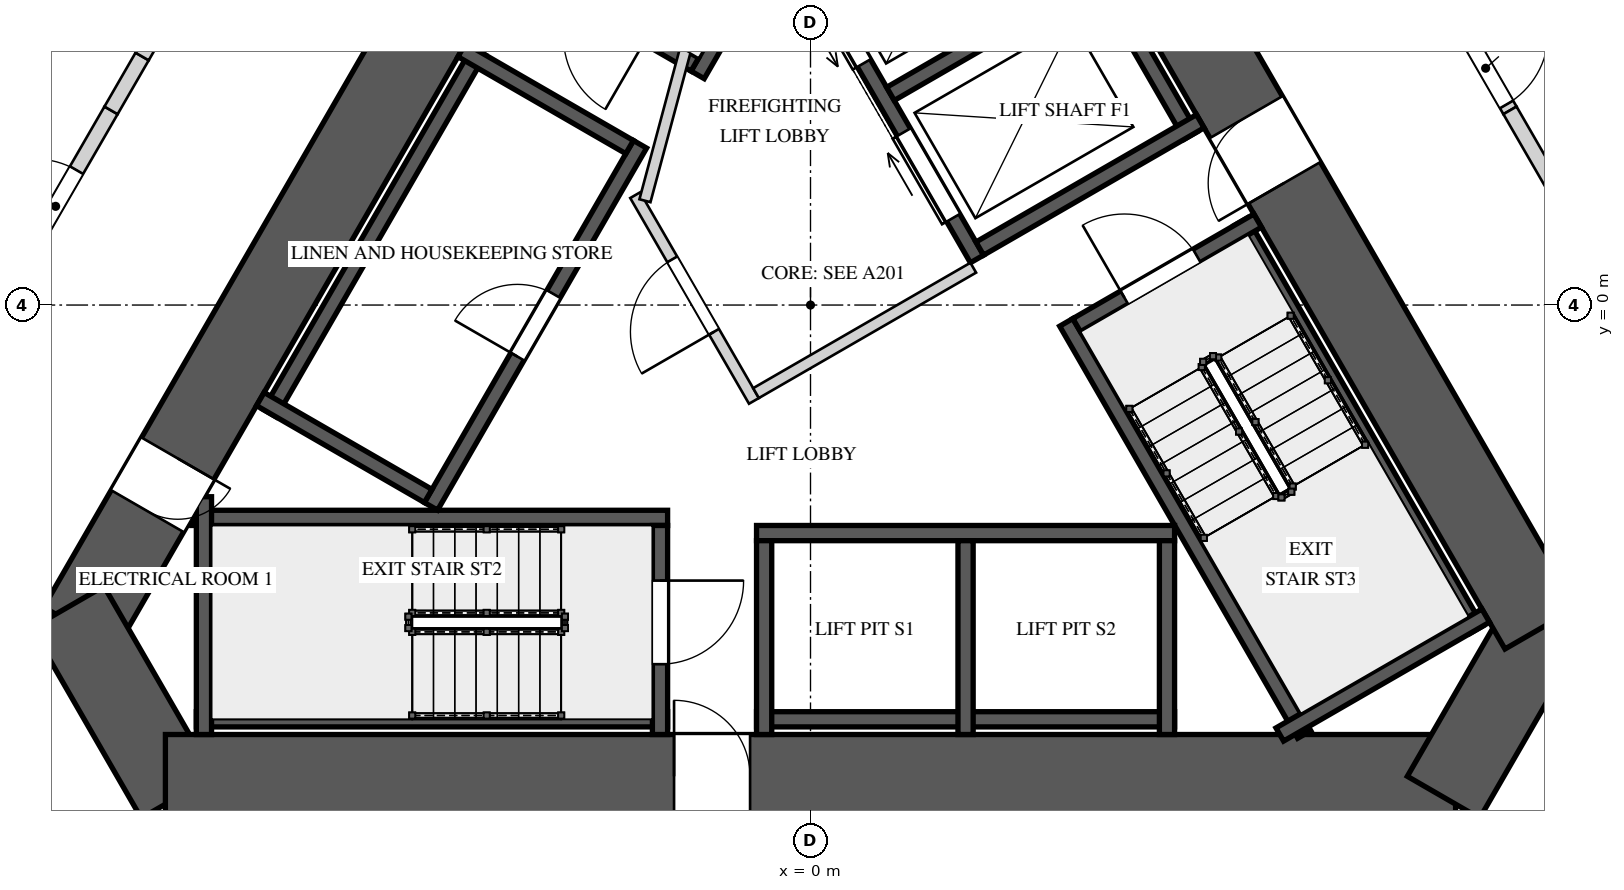
"""IFC4 building model, lengths in metres.
Left out: names, types, materials, properties, quantities, classifications, styles, units other than length and angle.
Written with IfcOpenShell. Run it as: python <this file> out.ifc"""

import sys

from ifc_helpers import new_model, si_unit, direction, frame, frame_2d, origin, place, context, subcontext, project, spatial, polyline, rectangle, outline, extrude, element, fill, save


model = new_model("IFC4")
c1 = context("Model", 3, precision=1e-05, world=origin(), true_north=direction((0.0, 1.0)))
c2 = subcontext(c1, "Body", "Model", "MODEL_VIEW")
j1 = project(units=[si_unit("LENGTHUNIT", "METRE"), si_unit("PLANEANGLEUNIT", "RADIAN")], contexts=[c1])
p1 = place(None, origin())
s1 = spatial("IfcSite", under=j1, at=p1, CompositionType="ELEMENT")
p2 = place(p1, origin())
s2 = spatial("IfcBuilding", under=s1, at=p2, CompositionType="ELEMENT")
p3 = place(p2, frame((0.0, 0.0, -5.0)))
s3 = spatial("IfcBuildingStorey", under=s2, at=p3, CompositionType="ELEMENT", Elevation=-5.0)
for number, where, z_axis, x_axis in (
    (1, (-2.454, 33.25, -0.3), (0.0, 0.0, 1.0), (-0.5, -0.866, 0.0)),
    (2, (30.022, -14.5, -0.3), (0.0, 0.0, 1.0), (-0.5, 0.866, 0.0)),
):
    element("IfcWall", number, at=place(p3, frame(where, z_axis=z_axis, x_axis=x_axis)), inside=s3, PredefinedType="SHEAR", context=c2, shape_type="SweptSolid", body=[
        extrude(rectangle(XDim=55.137, YDim=0.5, at=frame_2d((27.568, 0.0))), origin(), (0.0, 0.0, 1.0), 5.3),
    ])
p4 = place(p3, frame((-1.126, 10.45, -0.3), z_axis=(0.0, 0.0, 1.0), x_axis=(-0.500001757713, -0.866024388966, 0.0)))
e3 = element("IfcWall", 3, at=p4, inside=s3, PredefinedType="SHEAR", context=c2, shape_type="SweptSolid", body=[
    extrude(rectangle(XDim=16.974, YDim=1.1, at=frame_2d((8.487, 0.0))), origin(), (0.0, 0.0, 1.0), 5.3),
])
p5 = place(p4, frame((6.692, 0.0, 0.3)))
e4 = element("IfcOpeningElement", 4, at=p5, cuts=e3, PredefinedType="OPENING", context=c2, shape_type="SweptSolid", body=[
    extrude(rectangle(XDim=1.0, YDim=2.4, at=frame_2d((0.5, 1.2))), frame((0.0, 0.56, 0.0), z_axis=(0.0, -1.0, 0.0), x_axis=(1.0, 0.0, 0.0)), (0.0, 0.0, 1.0), 1.12),
])
p6 = place(p4, frame((14.397, 0.0, 0.3)))
e5 = element("IfcOpeningElement", 5, at=p6, cuts=e3, PredefinedType="OPENING", context=c2, shape_type="SweptSolid", body=[
    extrude(rectangle(XDim=0.8, YDim=2.1, at=frame_2d((0.4, 1.05))), frame((0.0, 0.56, 0.0), z_axis=(0.0, -1.0, 0.0), x_axis=(1.0, 0.0, 0.0)), (0.0, 0.0, 1.0), 1.12),
])
p7 = place(p3, frame((-9.772, -3.975, -0.3), z_axis=(0.0, 0.0, 1.0), x_axis=(0.499995765644, -0.866027848477, 0.0)))
e6 = element("IfcWall", 6, at=p7, inside=s3, PredefinedType="SHEAR", context=c2, shape_type="SweptSolid", body=[
    extrude(rectangle(XDim=2.887, YDim=1.1, at=frame_2d((1.443, 0.0))), origin(), (0.0, 0.0, 1.0), 5.3),
])
p8 = place(p3, frame((-8.487, -6.2, -0.3), z_axis=(0.0, 0.0, 1.0), x_axis=(1.0, 0.0, 0.0)))
e7 = element("IfcWall", 7, at=p8, inside=s3, PredefinedType="SHEAR", context=c2, shape_type="SweptSolid", body=[
    extrude(rectangle(XDim=16.974, YDim=1.1, at=frame_2d((8.487, 0.0))), origin(), (0.0, 0.0, 1.0), 5.3),
])
p9 = place(p8, frame((6.692, 0.0, 0.3)))
e8 = element("IfcOpeningElement", 8, at=p9, cuts=e7, PredefinedType="OPENING", context=c2, shape_type="SweptSolid", body=[
    extrude(rectangle(XDim=1.0, YDim=2.4, at=frame_2d((0.5, 1.2))), frame((0.0, 0.56, 0.0), z_axis=(0.0, -1.0, 0.0), x_axis=(1.0, 0.0, 0.0)), (0.0, 0.0, 1.0), 1.12),
])
p10 = place(p3, frame((8.328, -6.475, -0.3), z_axis=(0.0, 0.0, 1.0), x_axis=(0.499995765644, 0.866027848477, 0.0)))
e9 = element("IfcWall", 9, at=p10, inside=s3, PredefinedType="SHEAR", context=c2, shape_type="SweptSolid", body=[
    extrude(rectangle(XDim=2.887, YDim=1.1, at=frame_2d((1.443, 0.0))), origin(), (0.0, 0.0, 1.0), 5.3),
])
p11 = place(p3, frame((9.613, -4.25, -0.3), z_axis=(0.0, 0.0, 1.0), x_axis=(-0.500001757713, 0.866024388966, 0.0)))
e10 = element("IfcWall", 10, at=p11, inside=s3, PredefinedType="SHEAR", context=c2, shape_type="SweptSolid", body=[
    extrude(rectangle(XDim=16.974, YDim=1.1, at=frame_2d((8.487, 0.0))), origin(), (0.0, 0.0, 1.0), 5.3),
])
p12 = place(p11, frame((6.762, 0.0, 0.3)))
e11 = element("IfcOpeningElement", 11, at=p12, cuts=e10, PredefinedType="OPENING", context=c2, shape_type="SweptSolid", body=[
    extrude(rectangle(XDim=1.0, YDim=2.4, at=frame_2d((0.5, 1.2))), frame((0.0, 0.56, 0.0), z_axis=(0.0, -1.0, 0.0), x_axis=(1.0, 0.0, 0.0)), (0.0, 0.0, 1.0), 1.12),
])
p13 = place(p3, frame((1.646, 8.45, 0.0), z_axis=(0.0, 0.0, 1.0), x_axis=(-0.500006002103, -0.866021938441, 0.0)))
e12 = element("IfcWall", 12, at=p13, inside=s3, PredefinedType="SOLIDWALL", context=c2, shape_type="SweptSolid", body=[
    extrude(rectangle(XDim=6.261, YDim=0.2, at=frame_2d((3.13, 0.0))), origin(), (0.0, 0.0, 1.0), 4.65),
])
p14 = place(p3, frame((-1.521, 3.165, 0.0), z_axis=(0.0, 0.0, 1.0), x_axis=(-0.866027397988, 0.499996545922, 0.0)))
e13 = element("IfcWall", 13, at=p14, inside=s3, PredefinedType="SOLIDWALL", context=c2, shape_type="SweptSolid", body=[
    extrude(rectangle(XDim=2.75, YDim=0.2, at=frame_2d((1.375, 0.0))), origin(), (0.0, 0.0, 1.0), 4.65),
])
p15 = place(p14, frame((0.725, 0.0, 0.0)))
e14 = element("IfcOpeningElement", 14, at=p15, cuts=e13, PredefinedType="OPENING", context=c2, shape_type="SweptSolid", body=[
    extrude(rectangle(XDim=1.1, YDim=2.4, at=frame_2d((0.55, 1.2))), frame((0.0, 0.11, 0.0), z_axis=(0.0, -1.0, 0.0), x_axis=(1.0, 0.0, 0.0)), (0.0, 0.0, 1.0), 0.22),
])
p16 = place(p3, frame((-8.08, -5.45, 0.0), z_axis=(0.0, 0.0, 1.0), x_axis=(1.0, 0.0, 0.0)))
e15 = element("IfcWall", 15, at=p16, inside=s3, PredefinedType="SOLIDWALL", context=c2, shape_type="SweptSolid", body=[
    extrude(rectangle(XDim=6.2, YDim=0.2, at=frame_2d((3.1, 0.0))), origin(), (0.0, 0.0, 1.0), 4.65),
])
p17 = place(p3, frame((-8.141, -2.8, 0.0), z_axis=(0.0, 0.0, 1.0), x_axis=(1.0, 0.0, 0.0)))
e16 = element("IfcWall", 16, at=p17, inside=s3, PredefinedType="SOLIDWALL", context=c2, shape_type="SweptSolid", body=[
    extrude(rectangle(XDim=6.261, YDim=0.2, at=frame_2d((3.13, 0.0))), origin(), (0.0, 0.0, 1.0), 4.65),
])
p18 = place(p3, frame((-7.98, -2.522, 0.0), z_axis=(0.0, 0.0, 1.0), x_axis=(0.0, -1.0, 0.0)))
e17 = element("IfcWall", 17, at=p18, inside=s3, PredefinedType="SOLIDWALL", context=c2, shape_type="SweptSolid", body=[
    extrude(rectangle(XDim=3.128, YDim=0.2, at=frame_2d((1.564, 0.0))), origin(), (0.0, 0.0, 1.0), 4.65),
])
p19 = place(p3, frame((-1.98, -2.9, 0.0), z_axis=(0.0, 0.0, 1.0), x_axis=(0.0, -1.0, 0.0)))
e18 = element("IfcWall", 18, at=p19, inside=s3, PredefinedType="SOLIDWALL", context=c2, shape_type="SweptSolid", body=[
    extrude(rectangle(XDim=2.75, YDim=0.2, at=frame_2d((1.375, 0.0))), origin(), (0.0, 0.0, 1.0), 4.65),
])
p20 = place(p19, frame((0.725, 0.0, 0.0)))
e19 = element("IfcOpeningElement", 19, at=p20, cuts=e18, PredefinedType="OPENING", context=c2, shape_type="SweptSolid", body=[
    extrude(rectangle(XDim=1.1, YDim=2.4, at=frame_2d((0.55, 1.2))), frame((0.0, 0.11, 0.0), z_axis=(0.0, -1.0, 0.0), x_axis=(1.0, 0.0, 0.0)), (0.0, 0.0, 1.0), 0.22),
])
p21 = place(p3, frame((8.76, -4.272, 0.0), z_axis=(0.0, 0.0, 1.0), x_axis=(-0.49998037582, 0.866036733513, 0.0)))
e20 = element("IfcWall", 20, at=p21, inside=s3, PredefinedType="SOLIDWALL", context=c2, shape_type="SweptSolid", body=[
    extrude(rectangle(XDim=6.2, YDim=0.2, at=frame_2d((3.1, 0.0))), origin(), (0.0, 0.0, 1.0), 4.65),
])
p22 = place(p3, frame((6.495, -5.65, 0.0), z_axis=(0.0, 0.0, 1.0), x_axis=(-0.499976754523, 0.866038824151, 0.0)))
e21 = element("IfcWall", 21, at=p22, inside=s3, PredefinedType="SOLIDWALL", context=c2, shape_type="SweptSolid", body=[
    extrude(rectangle(XDim=6.26, YDim=0.2, at=frame_2d((3.13, 0.0))), origin(), (0.0, 0.0, 1.0), 4.65),
])
p23 = place(p3, frame((6.174, -5.65, 0.0), z_axis=(0.0, 0.0, 1.0), x_axis=(0.866054327916, 0.499949898588, 0.0)))
e22 = element("IfcWall", 22, at=p23, inside=s3, PredefinedType="SOLIDWALL", context=c2, shape_type="SweptSolid", body=[
    extrude(rectangle(XDim=3.128, YDim=0.2, at=frame_2d((1.564, 0.0))), origin(), (0.0, 0.0, 1.0), 4.65),
])
p24 = place(p3, frame((3.501, -0.265, 0.0), z_axis=(0.0, 0.0, 1.0), x_axis=(0.866027397988, 0.499996545922, 0.0)))
e23 = element("IfcWall", 23, at=p24, inside=s3, PredefinedType="SOLIDWALL", context=c2, shape_type="SweptSolid", body=[
    extrude(rectangle(XDim=2.75, YDim=0.2, at=frame_2d((1.375, 0.0))), origin(), (0.0, 0.0, 1.0), 4.65),
])
p25 = place(p24, frame((0.725, 0.0, 0.0)))
e24 = element("IfcOpeningElement", 24, at=p25, cuts=e23, PredefinedType="OPENING", context=c2, shape_type="SweptSolid", body=[
    extrude(rectangle(XDim=1.1, YDim=2.4, at=frame_2d((0.55, 1.2))), frame((0.0, 0.11, 0.0), z_axis=(0.0, -1.0, 0.0), x_axis=(1.0, 0.0, 0.0)), (0.0, 0.0, 1.0), 0.22),
])
p26 = place(p3, frame((-4.993, -2.648, 0.0), z_axis=(0.0, 0.0, 1.0), x_axis=(0.499996545922, 0.866027397988, 0.0)))
e25 = element("IfcWall", 25, at=p26, inside=s3, PredefinedType="SOLIDWALL", context=c2, shape_type="SweptSolid", body=[
    extrude(rectangle(XDim=5.5, YDim=0.2, at=frame_2d((2.75, 0.0))), origin(), (0.0, 0.0, 1.0), 4.65),
])
p27 = place(p26, frame((2.275, 0.0, 0.0)))
e26 = element("IfcOpeningElement", 26, at=p27, cuts=e25, PredefinedType="OPENING", context=c2, shape_type="SweptSolid", body=[
    extrude(rectangle(XDim=0.95, YDim=2.4, at=frame_2d((0.475, 1.2))), frame((0.0, 0.11, 0.0), z_axis=(0.0, -1.0, 0.0), x_axis=(1.0, 0.0, 0.0)), (0.0, 0.0, 1.0), 0.22),
])
p28 = place(p3, frame((-4.365, 3.34, 0.0), z_axis=(0.0, 0.0, 1.0), x_axis=(-0.499996545922, -0.866027397988, 0.0)))
e27 = element("IfcWall", 27, at=p28, inside=s3, PredefinedType="SOLIDWALL", context=c2, shape_type="SweptSolid", body=[
    extrude(rectangle(XDim=5.5, YDim=0.2, at=frame_2d((2.75, 0.0))), origin(), (0.0, 0.0, 1.0), 4.65),
])
for number, where, z_axis, x_axis in (
    (28, (-2.38, 2.078, 0.0), (0.0, 0.0, 1.0), (-0.866, 0.5, 0.0)),
    (29, (-5.03, -2.512, 0.0), (0.0, 0.0, 1.0), (-0.866, 0.5, 0.0)),
):
    element("IfcWall", number, at=place(p3, frame(where, z_axis=z_axis, x_axis=x_axis)), inside=s3, PredefinedType="SOLIDWALL", context=c2, shape_type="SweptSolid", body=[
        extrude(rectangle(XDim=2.55, YDim=0.2, at=frame_2d((1.275, 0.0))), origin(), (0.0, 0.0, 1.0), 4.65),
    ])
for number, where, z_axis, x_axis in (
    (30, (-0.71, -3.0, 0.0), (0.0, 0.0, 1.0), (1.0, 0.0, 0.0)),
    (31, (-0.71, -5.45, 0.0), (0.0, 0.0, 1.0), (1.0, 0.0, 0.0)),
):
    element("IfcWall", number, at=place(p3, frame(where, z_axis=z_axis, x_axis=x_axis)), inside=s3, PredefinedType="SOLIDWALL", context=c2, shape_type="SweptSolid", body=[
        extrude(rectangle(XDim=5.5, YDim=0.2, at=frame_2d((2.75, 0.0))), origin(), (0.0, 0.0, 1.0), 4.65),
    ])
for number, where, z_axis, x_axis in (
    (32, (-0.61, -3.1, 0.0), (0.0, 0.0, 1.0), (0.0, -1.0, 0.0)),
    (33, (2.04, -3.1, 0.0), (0.0, 0.0, 1.0), (0.0, -1.0, 0.0)),
    (34, (4.69, -3.1, 0.0), (0.0, 0.0, 1.0), (0.0, -1.0, 0.0)),
):
    element("IfcWall", number, at=place(p3, frame(where, z_axis=z_axis, x_axis=x_axis)), inside=s3, PredefinedType="SOLIDWALL", context=c2, shape_type="SweptSolid", body=[
        extrude(rectangle(XDim=2.55, YDim=0.2, at=frame_2d((1.275, 0.0))), origin(), (0.0, 0.0, 1.0), 4.65),
    ])
p29 = place(p3, frame((2.19, 0.606, 0.0), z_axis=(0.0, 0.0, 1.0), x_axis=(-0.500002801628, 0.866023786258, 0.0)))
e35 = element("IfcWall", 35, at=p29, inside=s3, PredefinedType="SOLIDWALL", context=c2, shape_type="SweptSolid", body=[
    extrude(rectangle(XDim=4.9, YDim=0.2, at=frame_2d((2.45, 0.0))), origin(), (0.0, 0.0, 1.0), 4.65),
])
p30 = place(p29, frame((0.625, 0.0, 0.0)))
e36 = element("IfcOpeningElement", 36, at=p30, cuts=e35, PredefinedType="OPENING", context=c2, shape_type="SweptSolid", body=[
    extrude(rectangle(XDim=1.3, YDim=2.1, at=frame_2d((0.65, 1.05))), frame((0.0, 0.11, 0.0), z_axis=(0.0, -1.0, 0.0), x_axis=(1.0, 0.0, 0.0)), (0.0, 0.0, 1.0), 0.22),
])
p31 = place(p29, frame((2.975, 0.0, 0.0)))
e37 = element("IfcOpeningElement", 37, at=p31, cuts=e35, PredefinedType="OPENING", context=c2, shape_type="SweptSolid", body=[
    extrude(rectangle(XDim=1.3, YDim=2.1, at=frame_2d((0.65, 1.05))), frame((0.0, 0.11, 0.0), z_axis=(0.0, -1.0, 0.0), x_axis=(1.0, 0.0, 0.0)), (0.0, 0.0, 1.0), 0.22),
])
p32 = place(p3, frame((5.005, 2.231, 0.0), z_axis=(0.0, 0.0, 1.0), x_axis=(-0.500002801628, 0.866023786258, 0.0)))
e38 = element("IfcWall", 38, at=p32, inside=s3, PredefinedType="SOLIDWALL", context=c2, shape_type="SweptSolid", body=[
    extrude(rectangle(XDim=4.9, YDim=0.2, at=frame_2d((2.45, 0.0))), origin(), (0.0, 0.0, 1.0), 4.65),
])
p33 = place(p3, frame((2.227, 0.743, 0.0), z_axis=(0.0, 0.0, 1.0), x_axis=(0.866014461049, 0.500018952895, 0.0)))
e39 = element("IfcWall", 39, at=p33, inside=s3, PredefinedType="SOLIDWALL", context=c2, shape_type="SweptSolid", body=[
    extrude(rectangle(XDim=3.35, YDim=0.2, at=frame_2d((1.675, 0.0))), origin(), (0.0, 0.0, 1.0), 4.65),
])
p34 = place(p3, frame((1.052, 2.778, 0.0), z_axis=(0.0, 0.0, 1.0), x_axis=(0.866032680314, 0.499987396469, 0.0)))
e40 = element("IfcWall", 40, at=p34, inside=s3, PredefinedType="SOLIDWALL", context=c2, shape_type="SweptSolid", body=[
    extrude(rectangle(XDim=3.35, YDim=0.2, at=frame_2d((1.675, 0.0))), origin(), (0.0, 0.0, 1.0), 4.65),
])
p35 = place(p3, frame((-0.744, -1.261, 0.0), z_axis=(0.0, 0.0, 1.0), x_axis=(-0.500004234368, 0.866022959057, 0.0)))
e41 = element("IfcWall", 41, at=p35, inside=s3, PredefinedType="PARTITIONING", context=c2, shape_type="SweptSolid", body=[
    extrude(rectangle(XDim=3.125, YDim=0.15, at=frame_2d((1.562, 0.0))), origin(), (0.0, 0.0, 1.0), 4.65),
])
p36 = place(p35, frame((1.05, 0.0, 0.0)))
e42 = element("IfcOpeningElement", 42, at=p36, cuts=e41, PredefinedType="OPENING", context=c2, shape_type="SweptSolid", body=[
    extrude(rectangle(XDim=1.1, YDim=2.4, at=frame_2d((0.55, 1.2))), frame((0.0, 0.085, 0.0), z_axis=(0.0, -1.0, 0.0), x_axis=(1.0, 0.0, 0.0)), (0.0, 0.0, 1.0), 0.17),
])
p37 = place(p3, frame((-0.717, -1.159, 0.0), z_axis=(0.0, 0.0, 1.0), x_axis=(0.866008176907, 0.50002983664, 0.0)))
e43 = element("IfcWall", 43, at=p37, inside=s3, PredefinedType="PARTITIONING", context=c2, shape_type="SweptSolid", body=[
    extrude(rectangle(XDim=3.3, YDim=0.15, at=frame_2d((1.65, 0.0))), origin(), (0.0, 0.0, 1.0), 4.65),
])
p38 = place(p3, frame((-2.178, 1.372, 0.0), z_axis=(0.0, 0.0, 1.0), x_axis=(0.258808958833, 0.96592852884, 0.0)))
e44 = element("IfcWall", 44, at=p38, inside=s3, PredefinedType="PARTITIONING", context=c2, shape_type="SweptSolid", body=[
    extrude(rectangle(XDim=2.903, YDim=0.15, at=frame_2d((1.451, 0.0))), origin(), (0.0, 0.0, 1.0), 4.65),
])
p39 = place(p3, frame((8.582, 3.635, 0.0), z_axis=(0.0, 0.0, 1.0), x_axis=(0.500034869029, -0.866005271205, 0.0)))
e45 = element("IfcWall", 45, at=p39, inside=s3, PredefinedType="SOLIDWALL", context=c2, shape_type="SweptSolid", body=[
    extrude(outline(polyline([(0.0, 0.0), (1.24, 0.0), (1.24, 3.75), (0.422, 3.75), (0.422, 4.65), (0.0, 4.65), (0.0, 0.0)])), frame((0.0, 0.1, 0.0), z_axis=(0.0, -1.0, 0.0), x_axis=(1.0, 0.0, 0.0)), (0.0, 0.0, 1.0), 0.2),
])
p40 = place(p39, frame((0.05, 0.0, 0.0)))
e46 = element("IfcOpeningElement", 46, at=p40, cuts=e45, PredefinedType="OPENING", context=c2, shape_type="SweptSolid", body=[
    extrude(rectangle(XDim=1.1, YDim=2.4, at=frame_2d((0.55, 1.2))), frame((0.0, 0.11, 0.0), z_axis=(0.0, -1.0, 0.0), x_axis=(1.0, 0.0, 0.0)), (0.0, 0.0, 1.0), 0.22),
])
p41 = place(p3, frame((9.202, 2.561, 0.0), z_axis=(0.0, 0.0, 1.0), x_axis=(0.499952348839, -0.866052913447, 0.0)))
e47 = element("IfcWall", 47, at=p41, inside=s3, PredefinedType="SOLIDWALL", context=c2, shape_type="SweptSolid", body=[
    extrude(rectangle(XDim=3.064, YDim=0.2, at=frame_2d((1.532, 0.0))), origin(), (0.0, 0.0, 1.0), 4.65),
])
p42 = place(p3, frame((-10.734, -0.093, 0.0), z_axis=(0.0, 0.0, 1.0), x_axis=(0.499952348839, 0.866052913447, 0.0)))
e48 = element("IfcWall", 48, at=p42, inside=s3, PredefinedType="SOLIDWALL", context=c2, shape_type="SweptSolid", body=[
    extrude(rectangle(XDim=3.064, YDim=0.2, at=frame_2d((1.532, 0.0))), origin(), (0.0, 0.0, 1.0), 4.65),
])
p43 = place(p42, frame((1.057, 0.0, 0.0)))
e49 = element("IfcOpeningElement", 49, at=p43, cuts=e48, PredefinedType="OPENING", context=c2, shape_type="SweptSolid", body=[
    extrude(rectangle(XDim=1.1, YDim=2.4, at=frame_2d((0.55, 1.2))), frame((0.0, 0.11, 0.0), z_axis=(0.0, -1.0, 0.0), x_axis=(1.0, 0.0, 0.0)), (0.0, 0.0, 1.0), 0.22),
])
p44 = place(p3, frame((-9.202, 2.561, 0.0), z_axis=(0.0, 0.0, 1.0), x_axis=(0.500118501653, 0.865956976012, 0.0)))
e50 = element("IfcWall", 50, at=p44, inside=s3, PredefinedType="SOLIDWALL", context=c2, shape_type="SweptSolid", body=[
    extrude(rectangle(XDim=0.818, YDim=0.2, at=frame_2d((0.409, 0.0))), origin(), (0.0, 0.0, 1.0), 3.75),
])
p45 = place(p3, frame((-8.793, 3.27, 0.0), z_axis=(0.0, 0.0, 1.0), x_axis=(0.499947505232, 0.866055709532, 0.0)))
e51 = element("IfcWall", 51, at=p45, inside=s3, PredefinedType="SOLIDWALL", context=c2, shape_type="SweptSolid", body=[
    extrude(rectangle(XDim=3.13, YDim=0.2, at=frame_2d((1.565, 0.0))), origin(), (0.0, 0.0, 1.0), 4.65),
])
p46 = place(p20, origin())
e52 = element("IfcDoor", 52, at=p46, inside=s3, OperationType="SINGLE_SWING_LEFT", PredefinedType="DOOR", context=c2, shape_type="SweptSolid", body=[
    extrude(rectangle(XDim=1.1, YDim=2.4, at=frame_2d((0.55, 1.2))), frame((0.0, 0.025, 0.0), z_axis=(0.0, -1.0, 0.0), x_axis=(1.0, 0.0, 0.0)), (0.0, 0.0, 1.0), 0.05),
])
fill(e19, e52)
p47 = place(p25, origin())
e53 = element("IfcDoor", 53, at=p47, inside=s3, OperationType="SINGLE_SWING_RIGHT", PredefinedType="DOOR", context=c2, shape_type="SweptSolid", body=[
    extrude(rectangle(XDim=1.1, YDim=2.4, at=frame_2d((0.55, 1.2))), frame((0.0, 0.025, 0.0), z_axis=(0.0, -1.0, 0.0), x_axis=(1.0, 0.0, 0.0)), (0.0, 0.0, 1.0), 0.05),
])
fill(e24, e53)
p48 = place(p27, origin())
e54 = element("IfcDoor", 54, at=p48, inside=s3, OperationType="SINGLE_SWING_LEFT", PredefinedType="DOOR", context=c2, shape_type="SweptSolid", body=[
    extrude(rectangle(XDim=0.95, YDim=2.4, at=frame_2d((0.475, 1.2))), frame((0.0, 0.025, 0.0), z_axis=(0.0, -1.0, 0.0), x_axis=(1.0, 0.0, 0.0)), (0.0, 0.0, 1.0), 0.05),
])
fill(e26, e54)
p49 = place(p30, origin())
e55 = element("IfcDoor", 55, at=p49, inside=s3, OperationType="SLIDING_TO_RIGHT", PredefinedType="DOOR", context=c2, shape_type="SweptSolid", body=[
    extrude(rectangle(XDim=1.3, YDim=2.1, at=frame_2d((0.65, 1.05))), frame((0.0, 0.025, 0.0), z_axis=(0.0, -1.0, 0.0), x_axis=(1.0, 0.0, 0.0)), (0.0, 0.0, 1.0), 0.05),
])
fill(e36, e55)
p50 = place(p31, origin())
e56 = element("IfcDoor", 56, at=p50, inside=s3, OperationType="SLIDING_TO_LEFT", PredefinedType="DOOR", context=c2, shape_type="SweptSolid", body=[
    extrude(rectangle(XDim=1.3, YDim=2.1, at=frame_2d((0.65, 1.05))), frame((0.0, 0.025, 0.0), z_axis=(0.0, -1.0, 0.0), x_axis=(1.0, 0.0, 0.0)), (0.0, 0.0, 1.0), 0.05),
])
fill(e37, e56)
p51 = place(p36, origin())
e57 = element("IfcDoor", 57, at=p51, inside=s3, OperationType="SINGLE_SWING_RIGHT", PredefinedType="DOOR", context=c2, shape_type="SweptSolid", body=[
    extrude(rectangle(XDim=1.1, YDim=2.4, at=frame_2d((0.55, 1.2))), frame((0.0, 0.025, 0.0), z_axis=(0.0, -1.0, 0.0), x_axis=(1.0, 0.0, 0.0)), (0.0, 0.0, 1.0), 0.05),
])
fill(e42, e57)
p52 = place(p9, origin())
e58 = element("IfcDoor", 58, at=p52, inside=s3, OperationType="SINGLE_SWING_RIGHT", PredefinedType="DOOR", context=c2, shape_type="SweptSolid", body=[
    extrude(rectangle(XDim=1.0, YDim=2.4, at=frame_2d((0.5, 1.2))), frame((0.0, 0.025, 0.0), z_axis=(0.0, -1.0, 0.0), x_axis=(1.0, 0.0, 0.0)), (0.0, 0.0, 1.0), 0.05),
])
fill(e8, e58)
p53 = place(p12, origin())
e59 = element("IfcDoor", 59, at=p53, inside=s3, OperationType="SINGLE_SWING_LEFT", PredefinedType="DOOR", context=c2, shape_type="SweptSolid", body=[
    extrude(rectangle(XDim=1.0, YDim=2.4, at=frame_2d((0.5, 1.2))), frame((0.0, 0.025, 0.0), z_axis=(0.0, -1.0, 0.0), x_axis=(1.0, 0.0, 0.0)), (0.0, 0.0, 1.0), 0.05),
])
fill(e11, e59)
p54 = place(p6, origin())
e60 = element("IfcDoor", 60, at=p54, inside=s3, OperationType="SINGLE_SWING_RIGHT", PredefinedType="DOOR", context=c2, shape_type="SweptSolid", body=[
    extrude(rectangle(XDim=0.8, YDim=2.1, at=frame_2d((0.4, 1.05))), frame((0.0, 0.025, 0.0), z_axis=(0.0, -1.0, 0.0), x_axis=(1.0, 0.0, 0.0)), (0.0, 0.0, 1.0), 0.05),
])
fill(e5, e60)
p55 = place(p40, origin())
e61 = element("IfcDoor", 61, at=p55, inside=s3, OperationType="SINGLE_SWING_LEFT", PredefinedType="DOOR", context=c2, shape_type="SweptSolid", body=[
    extrude(rectangle(XDim=1.1, YDim=2.4, at=frame_2d((0.55, 1.2))), frame((0.0, 0.025, 0.0), z_axis=(0.0, -1.0, 0.0), x_axis=(1.0, 0.0, 0.0)), (0.0, 0.0, 1.0), 0.05),
])
fill(e46, e61)
p56 = place(p43, origin())
e62 = element("IfcDoor", 62, at=p56, inside=s3, OperationType="SINGLE_SWING_RIGHT", PredefinedType="DOOR", context=c2, shape_type="SweptSolid", body=[
    extrude(rectangle(XDim=1.1, YDim=2.4, at=frame_2d((0.55, 1.2))), frame((0.0, 0.025, 0.0), z_axis=(0.0, -1.0, 0.0), x_axis=(1.0, 0.0, 0.0)), (0.0, 0.0, 1.0), 0.05),
])
fill(e49, e62)
save(model, sys.argv[1])
